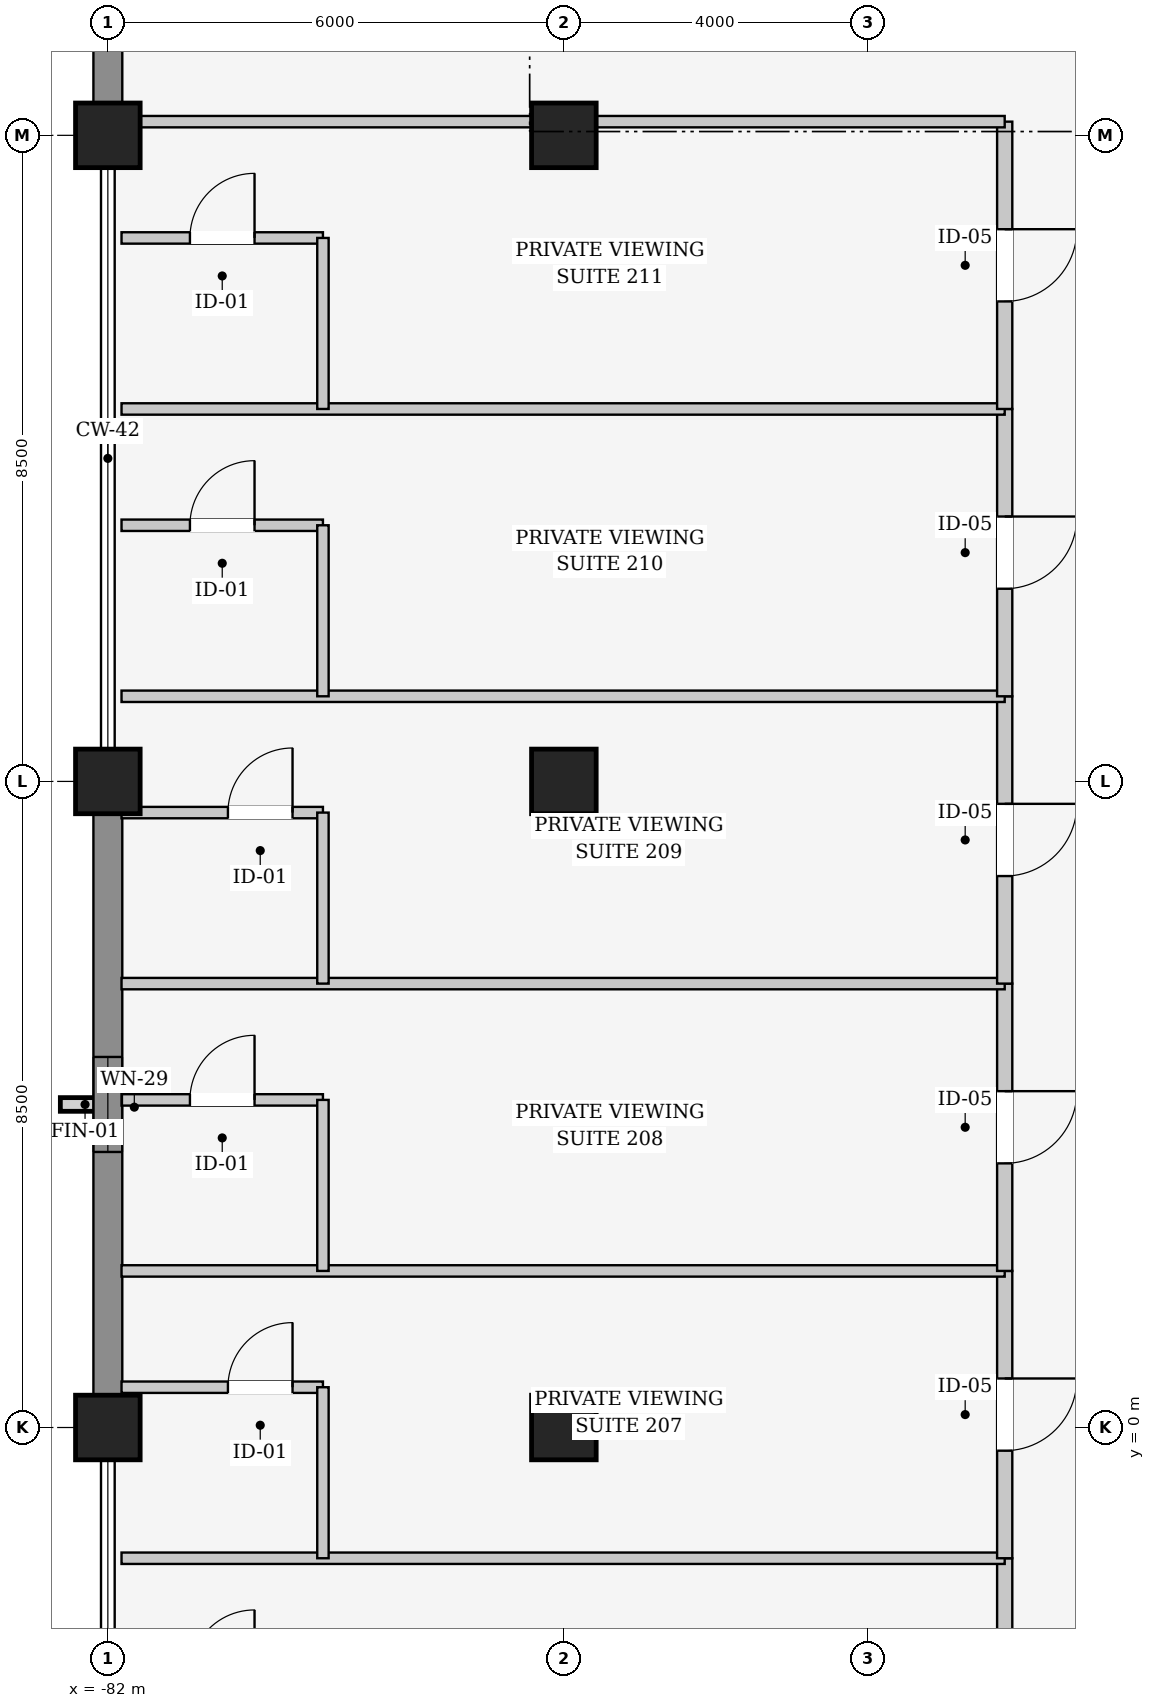
"""IFC4 building model, lengths in metres.
Left out: names, types, materials, properties, quantities, classifications, styles, units other than length and angle.
Written with IfcOpenShell. Run it as: python <this file> out.ifc"""

import sys

from ifc_helpers import new_model, si_unit, direction, frame, frame_2d, origin, origin_2d, place, context, subcontext, project, spatial, rectangle, extrude, element, fill, save


model = new_model("IFC4")
c1 = context("Model", 3, precision=1e-05, world=origin(), true_north=direction((0.0, 1.0)))
c2 = subcontext(c1, "Body", "Model", "MODEL_VIEW")
j1 = project(units=[si_unit("LENGTHUNIT", "METRE"), si_unit("PLANEANGLEUNIT", "RADIAN")], contexts=[c1])
p1 = place(None, origin())
s1 = spatial("IfcSite", under=j1, at=p1, CompositionType="ELEMENT")
p2 = place(p1, origin())
s2 = spatial("IfcBuilding", under=s1, at=p2, CompositionType="ELEMENT")
p3 = place(p2, frame((0.0, 0.0, 11.4)))
s3 = spatial("IfcBuildingStorey", under=s2, at=p3, CompositionType="ELEMENT", Elevation=11.4)
for number, where, z_axis, x_axis in (
    (1, (-82.0, 0.0, 0.0), (0.0, 0.0, 1.0), (1.0, 0.0, 0.0)),
    (2, (-82.0, 8.5, 0.0), (0.0, 0.0, 1.0), (1.0, 0.0, 0.0)),
    (3, (-82.0, 17.0, 0.0), (0.0, 0.0, 1.0), (1.0, 0.0, 0.0)),
    (4, (-76.0, 0.0, 0.0), (0.0, 0.0, 1.0), (1.0, 0.0, 0.0)),
    (5, (-76.0, 8.5, 0.0), (0.0, 0.0, 1.0), (1.0, 0.0, 0.0)),
    (6, (-76.0, 17.0, 0.0), (0.0, 0.0, 1.0), (1.0, 0.0, 0.0)),
):
    element("IfcColumn", number, at=place(p3, frame(where, z_axis=z_axis, x_axis=x_axis)), inside=s3, PredefinedType="COLUMN", context=c2, shape_type="SweptSolid", body=[
        extrude(rectangle(XDim=0.85, YDim=0.85, at=origin_2d()), origin(), (0.0, 0.0, 1.0), 4.8),
    ])
p4 = place(p3, frame((-82.0, 0.407, 0.0), z_axis=(0.0, 0.0, 1.0), x_axis=(0.0, 1.0, 0.0)))
e7 = element("IfcWall", 7, at=p4, inside=s3, PredefinedType="SOLIDWALL", context=c2, shape_type="SweptSolid", body=[
    extrude(rectangle(XDim=7.686, YDim=0.38, at=frame_2d((3.843, 0.0))), origin(), (0.0, 0.0, 1.0), 3.76),
])
p5 = place(p4, frame((3.218, 0.0, 0.9)))
e8 = element("IfcOpeningElement", 8, at=p5, cuts=e7, PredefinedType="OPENING", context=c2, shape_type="SweptSolid", body=[
    extrude(rectangle(XDim=1.25, YDim=2.0, at=frame_2d((0.625, 1.0))), frame((0.0, 0.2, 0.0), z_axis=(0.0, -1.0, 0.0), x_axis=(1.0, 0.0, 0.0)), (0.0, 0.0, 1.0), 0.4),
])
p6 = place(p3, frame((-82.0, 17.407, 0.0), z_axis=(0.0, 0.0, 1.0), x_axis=(0.0, 1.0, 0.0)))
e9 = element("IfcWall", 9, at=p6, inside=s3, PredefinedType="SOLIDWALL", context=c2, shape_type="SweptSolid", body=[
    extrude(rectangle(XDim=7.186, YDim=0.38, at=frame_2d((3.593, 0.0))), origin(), (0.0, 0.0, 1.0), 3.76),
])
p7 = place(p6, frame((2.868, 0.0, 0.9)))
e10 = element("IfcOpeningElement", 10, at=p7, cuts=e9, PredefinedType="OPENING", context=c2, shape_type="SweptSolid", body=[
    extrude(rectangle(XDim=1.45, YDim=2.0, at=frame_2d((0.725, 1.0))), frame((0.0, 0.2, 0.0), z_axis=(0.0, -1.0, 0.0), x_axis=(1.0, 0.0, 0.0)), (0.0, 0.0, 1.0), 0.4),
])
p8 = place(p3, frame((-70.2, -1.72, 0.0), z_axis=(0.0, 0.0, 1.0), x_axis=(0.0, -1.0, 0.0)))
e11 = element("IfcWall", 11, at=p8, inside=s3, PredefinedType="PARTITIONING", context=c2, shape_type="SweptSolid", body=[
    extrude(rectangle(XDim=3.78, YDim=0.2, at=frame_2d((1.89, 0.0))), origin(), (0.0, 0.0, 1.0), 4.14),
])
p9 = place(p8, frame((1.415, 0.0, 0.0)))
e12 = element("IfcOpeningElement", 12, at=p9, cuts=e11, PredefinedType="OPENING", context=c2, shape_type="SweptSolid", body=[
    extrude(rectangle(XDim=0.95, YDim=2.25, at=frame_2d((0.475, 1.125))), frame((0.0, 0.11, 0.0), z_axis=(0.0, -1.0, 0.0), x_axis=(1.0, 0.0, 0.0)), (0.0, 0.0, 1.0), 0.22),
])
p10 = place(p3, frame((-81.82, -1.72, 0.0), z_axis=(0.0, 0.0, 1.0), x_axis=(1.0, 0.0, 0.0)))
e13 = element("IfcWall", 13, at=p10, inside=s3, PredefinedType="PARTITIONING", context=c2, shape_type="SweptSolid", body=[
    extrude(rectangle(XDim=11.62, YDim=0.15, at=frame_2d((5.81, 0.0))), origin(), (0.0, 0.0, 1.0), 3.845),
])
p11 = place(p3, frame((-81.82, 0.53, 0.0), z_axis=(0.0, 0.0, 1.0), x_axis=(1.0, 0.0, 0.0)))
e14 = element("IfcWall", 14, at=p11, inside=s3, PredefinedType="PARTITIONING", context=c2, shape_type="SweptSolid", body=[
    extrude(rectangle(XDim=2.65, YDim=0.15, at=frame_2d((1.325, 0.0))), origin(), (0.0, 0.0, 1.0), 3.845),
])
p12 = place(p11, frame((1.4, 0.0, 0.0)))
e15 = element("IfcOpeningElement", 15, at=p12, cuts=e14, PredefinedType="OPENING", context=c2, shape_type="SweptSolid", body=[
    extrude(rectangle(XDim=0.85, YDim=2.15, at=frame_2d((0.425, 1.075))), frame((0.0, 0.085, 0.0), z_axis=(0.0, -1.0, 0.0), x_axis=(1.0, 0.0, 0.0)), (0.0, 0.0, 1.0), 0.17),
])
p13 = place(p3, frame((-79.17, 0.53, 0.0), z_axis=(0.0, 0.0, 1.0), x_axis=(0.0, -1.0, 0.0)))
e16 = element("IfcWall", 16, at=p13, inside=s3, PredefinedType="PARTITIONING", context=c2, shape_type="SweptSolid", body=[
    extrude(rectangle(XDim=2.25, YDim=0.15, at=frame_2d((1.125, 0.0))), origin(), (0.0, 0.0, 1.0), 3.745),
])
p14 = place(p3, frame((-70.2, 2.06, 0.0), z_axis=(0.0, 0.0, 1.0), x_axis=(0.0, -1.0, 0.0)))
e17 = element("IfcWall", 17, at=p14, inside=s3, PredefinedType="PARTITIONING", context=c2, shape_type="SweptSolid", body=[
    extrude(rectangle(XDim=3.78, YDim=0.2, at=frame_2d((1.89, 0.0))), origin(), (0.0, 0.0, 1.0), 3.545),
])
p15 = place(p14, frame((1.415, 0.0, 0.0)))
e18 = element("IfcOpeningElement", 18, at=p15, cuts=e17, PredefinedType="OPENING", context=c2, shape_type="SweptSolid", body=[
    extrude(rectangle(XDim=0.95, YDim=2.25, at=frame_2d((0.475, 1.125))), frame((0.0, 0.11, 0.0), z_axis=(0.0, -1.0, 0.0), x_axis=(1.0, 0.0, 0.0)), (0.0, 0.0, 1.0), 0.22),
])
p16 = place(p3, frame((-81.82, 2.06, 0.0), z_axis=(0.0, 0.0, 1.0), x_axis=(1.0, 0.0, 0.0)))
e19 = element("IfcWall", 19, at=p16, inside=s3, PredefinedType="PARTITIONING", context=c2, shape_type="SweptSolid", body=[
    extrude(rectangle(XDim=11.62, YDim=0.15, at=frame_2d((5.81, 0.0))), origin(), (0.0, 0.0, 1.0), 3.845),
])
p17 = place(p3, frame((-81.82, 4.31, 0.0), z_axis=(0.0, 0.0, 1.0), x_axis=(1.0, 0.0, 0.0)))
e20 = element("IfcWall", 20, at=p17, inside=s3, PredefinedType="PARTITIONING", context=c2, shape_type="SweptSolid", body=[
    extrude(rectangle(XDim=2.65, YDim=0.15, at=frame_2d((1.325, 0.0))), origin(), (0.0, 0.0, 1.0), 3.845),
])
p18 = place(p17, frame((0.9, 0.0, 0.0)))
e21 = element("IfcOpeningElement", 21, at=p18, cuts=e20, PredefinedType="OPENING", context=c2, shape_type="SweptSolid", body=[
    extrude(rectangle(XDim=0.85, YDim=2.15, at=frame_2d((0.425, 1.075))), frame((0.0, 0.085, 0.0), z_axis=(0.0, -1.0, 0.0), x_axis=(1.0, 0.0, 0.0)), (0.0, 0.0, 1.0), 0.17),
])
p19 = place(p3, frame((-79.17, 4.31, 0.0), z_axis=(0.0, 0.0, 1.0), x_axis=(0.0, -1.0, 0.0)))
e22 = element("IfcWall", 22, at=p19, inside=s3, PredefinedType="PARTITIONING", context=c2, shape_type="SweptSolid", body=[
    extrude(rectangle(XDim=2.25, YDim=0.15, at=frame_2d((1.125, 0.0))), origin(), (0.0, 0.0, 1.0), 4.14),
])
p20 = place(p3, frame((-70.2, 5.84, 0.0), z_axis=(0.0, 0.0, 1.0), x_axis=(0.0, -1.0, 0.0)))
e23 = element("IfcWall", 23, at=p20, inside=s3, PredefinedType="PARTITIONING", context=c2, shape_type="SweptSolid", body=[
    extrude(rectangle(XDim=3.78, YDim=0.2, at=frame_2d((1.89, 0.0))), origin(), (0.0, 0.0, 1.0), 4.14),
])
p21 = place(p20, frame((1.415, 0.0, 0.0)))
e24 = element("IfcOpeningElement", 24, at=p21, cuts=e23, PredefinedType="OPENING", context=c2, shape_type="SweptSolid", body=[
    extrude(rectangle(XDim=0.95, YDim=2.25, at=frame_2d((0.475, 1.125))), frame((0.0, 0.11, 0.0), z_axis=(0.0, -1.0, 0.0), x_axis=(1.0, 0.0, 0.0)), (0.0, 0.0, 1.0), 0.22),
])
p22 = place(p3, frame((-81.82, 5.84, 0.0), z_axis=(0.0, 0.0, 1.0), x_axis=(1.0, 0.0, 0.0)))
e25 = element("IfcWall", 25, at=p22, inside=s3, PredefinedType="PARTITIONING", context=c2, shape_type="SweptSolid", body=[
    extrude(rectangle(XDim=11.62, YDim=0.15, at=frame_2d((5.81, 0.0))), origin(), (0.0, 0.0, 1.0), 3.845),
])
p23 = place(p3, frame((-81.82, 8.09, 0.0), z_axis=(0.0, 0.0, 1.0), x_axis=(1.0, 0.0, 0.0)))
e26 = element("IfcWall", 26, at=p23, inside=s3, PredefinedType="PARTITIONING", context=c2, shape_type="SweptSolid", body=[
    extrude(rectangle(XDim=2.65, YDim=0.15, at=frame_2d((1.325, 0.0))), origin(), (0.0, 0.0, 1.0), 3.745),
])
p24 = place(p23, frame((1.4, 0.0, 0.0)))
e27 = element("IfcOpeningElement", 27, at=p24, cuts=e26, PredefinedType="OPENING", context=c2, shape_type="SweptSolid", body=[
    extrude(rectangle(XDim=0.85, YDim=2.15, at=frame_2d((0.425, 1.075))), frame((0.0, 0.085, 0.0), z_axis=(0.0, -1.0, 0.0), x_axis=(1.0, 0.0, 0.0)), (0.0, 0.0, 1.0), 0.17),
])
p25 = place(p3, frame((-79.17, 8.09, 0.0), z_axis=(0.0, 0.0, 1.0), x_axis=(0.0, -1.0, 0.0)))
e28 = element("IfcWall", 28, at=p25, inside=s3, PredefinedType="PARTITIONING", context=c2, shape_type="SweptSolid", body=[
    extrude(rectangle(XDim=2.25, YDim=0.15, at=frame_2d((1.125, 0.0))), origin(), (0.0, 0.0, 1.0), 3.745),
])
p26 = place(p3, frame((-70.2, 9.62, 0.0), z_axis=(0.0, 0.0, 1.0), x_axis=(0.0, -1.0, 0.0)))
e29 = element("IfcWall", 29, at=p26, inside=s3, PredefinedType="PARTITIONING", context=c2, shape_type="SweptSolid", body=[
    extrude(rectangle(XDim=3.78, YDim=0.2, at=frame_2d((1.89, 0.0))), origin(), (0.0, 0.0, 1.0), 3.545),
])
p27 = place(p26, frame((1.415, 0.0, 0.0)))
e30 = element("IfcOpeningElement", 30, at=p27, cuts=e29, PredefinedType="OPENING", context=c2, shape_type="SweptSolid", body=[
    extrude(rectangle(XDim=0.95, YDim=2.25, at=frame_2d((0.475, 1.125))), frame((0.0, 0.11, 0.0), z_axis=(0.0, -1.0, 0.0), x_axis=(1.0, 0.0, 0.0)), (0.0, 0.0, 1.0), 0.22),
])
p28 = place(p3, frame((-81.82, 9.62, 0.0), z_axis=(0.0, 0.0, 1.0), x_axis=(1.0, 0.0, 0.0)))
e31 = element("IfcWall", 31, at=p28, inside=s3, PredefinedType="PARTITIONING", context=c2, shape_type="SweptSolid", body=[
    extrude(rectangle(XDim=11.62, YDim=0.15, at=frame_2d((5.81, 0.0))), origin(), (0.0, 0.0, 1.0), 3.845),
])
p29 = place(p3, frame((-81.82, 11.87, 0.0), z_axis=(0.0, 0.0, 1.0), x_axis=(1.0, 0.0, 0.0)))
e32 = element("IfcWall", 32, at=p29, inside=s3, PredefinedType="PARTITIONING", context=c2, shape_type="SweptSolid", body=[
    extrude(rectangle(XDim=2.65, YDim=0.15, at=frame_2d((1.325, 0.0))), origin(), (0.0, 0.0, 1.0), 3.845),
])
p30 = place(p29, frame((0.9, 0.0, 0.0)))
e33 = element("IfcOpeningElement", 33, at=p30, cuts=e32, PredefinedType="OPENING", context=c2, shape_type="SweptSolid", body=[
    extrude(rectangle(XDim=0.85, YDim=2.15, at=frame_2d((0.425, 1.075))), frame((0.0, 0.085, 0.0), z_axis=(0.0, -1.0, 0.0), x_axis=(1.0, 0.0, 0.0)), (0.0, 0.0, 1.0), 0.17),
])
p31 = place(p3, frame((-79.17, 11.87, 0.0), z_axis=(0.0, 0.0, 1.0), x_axis=(0.0, -1.0, 0.0)))
e34 = element("IfcWall", 34, at=p31, inside=s3, PredefinedType="PARTITIONING", context=c2, shape_type="SweptSolid", body=[
    extrude(rectangle(XDim=2.25, YDim=0.15, at=frame_2d((1.125, 0.0))), origin(), (0.0, 0.0, 1.0), 4.44),
])
p32 = place(p3, frame((-70.2, 13.4, 0.0), z_axis=(0.0, 0.0, 1.0), x_axis=(0.0, -1.0, 0.0)))
e35 = element("IfcWall", 35, at=p32, inside=s3, PredefinedType="PARTITIONING", context=c2, shape_type="SweptSolid", body=[
    extrude(rectangle(XDim=3.78, YDim=0.2, at=frame_2d((1.89, 0.0))), origin(), (0.0, 0.0, 1.0), 4.14),
])
p33 = place(p32, frame((1.415, 0.0, 0.0)))
e36 = element("IfcOpeningElement", 36, at=p33, cuts=e35, PredefinedType="OPENING", context=c2, shape_type="SweptSolid", body=[
    extrude(rectangle(XDim=0.95, YDim=2.25, at=frame_2d((0.475, 1.125))), frame((0.0, 0.11, 0.0), z_axis=(0.0, -1.0, 0.0), x_axis=(1.0, 0.0, 0.0)), (0.0, 0.0, 1.0), 0.22),
])
p34 = place(p3, frame((-81.82, 13.4, 0.0), z_axis=(0.0, 0.0, 1.0), x_axis=(1.0, 0.0, 0.0)))
e37 = element("IfcWall", 37, at=p34, inside=s3, PredefinedType="PARTITIONING", context=c2, shape_type="SweptSolid", body=[
    extrude(rectangle(XDim=11.62, YDim=0.15, at=frame_2d((5.81, 0.0))), origin(), (0.0, 0.0, 1.0), 3.845),
])
p35 = place(p3, frame((-81.82, 15.65, 0.0), z_axis=(0.0, 0.0, 1.0), x_axis=(1.0, 0.0, 0.0)))
e38 = element("IfcWall", 38, at=p35, inside=s3, PredefinedType="PARTITIONING", context=c2, shape_type="SweptSolid", body=[
    extrude(rectangle(XDim=2.65, YDim=0.15, at=frame_2d((1.325, 0.0))), origin(), (0.0, 0.0, 1.0), 3.845),
])
p36 = place(p35, frame((0.9, 0.0, 0.0)))
e39 = element("IfcOpeningElement", 39, at=p36, cuts=e38, PredefinedType="OPENING", context=c2, shape_type="SweptSolid", body=[
    extrude(rectangle(XDim=0.85, YDim=2.15, at=frame_2d((0.425, 1.075))), frame((0.0, 0.085, 0.0), z_axis=(0.0, -1.0, 0.0), x_axis=(1.0, 0.0, 0.0)), (0.0, 0.0, 1.0), 0.17),
])
p37 = place(p3, frame((-79.17, 15.65, 0.0), z_axis=(0.0, 0.0, 1.0), x_axis=(0.0, -1.0, 0.0)))
e40 = element("IfcWall", 40, at=p37, inside=s3, PredefinedType="PARTITIONING", context=c2, shape_type="SweptSolid", body=[
    extrude(rectangle(XDim=2.25, YDim=0.15, at=frame_2d((1.125, 0.0))), origin(), (0.0, 0.0, 1.0), 4.44),
])
p38 = place(p3, frame((-70.2, 17.18, 0.0), z_axis=(0.0, 0.0, 1.0), x_axis=(0.0, -1.0, 0.0)))
e41 = element("IfcWall", 41, at=p38, inside=s3, PredefinedType="PARTITIONING", context=c2, shape_type="SweptSolid", body=[
    extrude(rectangle(XDim=3.78, YDim=0.2, at=frame_2d((1.89, 0.0))), origin(), (0.0, 0.0, 1.0), 3.545),
])
p39 = place(p38, frame((1.415, 0.0, 0.0)))
e42 = element("IfcOpeningElement", 42, at=p39, cuts=e41, PredefinedType="OPENING", context=c2, shape_type="SweptSolid", body=[
    extrude(rectangle(XDim=0.95, YDim=2.25, at=frame_2d((0.475, 1.125))), frame((0.0, 0.11, 0.0), z_axis=(0.0, -1.0, 0.0), x_axis=(1.0, 0.0, 0.0)), (0.0, 0.0, 1.0), 0.22),
])
p40 = place(p3, frame((-81.82, 17.18, 0.0), z_axis=(0.0, 0.0, 1.0), x_axis=(1.0, 0.0, 0.0)))
e43 = element("IfcWall", 43, at=p40, inside=s3, PredefinedType="PARTITIONING", context=c2, shape_type="SweptSolid", body=[
    extrude(rectangle(XDim=11.62, YDim=0.15, at=frame_2d((5.81, 0.0))), origin(), (0.0, 0.0, 1.0), 3.545),
])
p41 = place(p5, origin())
e44 = element("IfcWindow", 44, at=p41, inside=s3, PartitioningType="SINGLE_PANEL", PredefinedType="WINDOW", context=c2, shape_type="SweptSolid", body=[
    extrude(rectangle(XDim=1.25, YDim=2.0, at=frame_2d((0.625, 1.0))), frame((0.0, 0.03, 0.0), z_axis=(0.0, -1.0, 0.0), x_axis=(1.0, 0.0, 0.0)), (0.0, 0.0, 1.0), 0.06),
])
fill(e8, e44)
p42 = place(p12, origin())
e45 = element("IfcDoor", 45, at=p42, inside=s3, OperationType="SINGLE_SWING_RIGHT", PredefinedType="DOOR", context=c2, shape_type="SweptSolid", body=[
    extrude(rectangle(XDim=0.85, YDim=2.15, at=frame_2d((0.425, 1.075))), frame((0.0, 0.025, 0.0), z_axis=(0.0, -1.0, 0.0), x_axis=(1.0, 0.0, 0.0)), (0.0, 0.0, 1.0), 0.05),
])
fill(e15, e45)
p43 = place(p15, origin())
e46 = element("IfcDoor", 46, at=p43, inside=s3, OperationType="SINGLE_SWING_LEFT", PredefinedType="DOOR", context=c2, shape_type="SweptSolid", body=[
    extrude(rectangle(XDim=0.95, YDim=2.25, at=frame_2d((0.475, 1.125))), frame((0.0, 0.025, 0.0), z_axis=(0.0, -1.0, 0.0), x_axis=(1.0, 0.0, 0.0)), (0.0, 0.0, 1.0), 0.05),
])
fill(e18, e46)
p44 = place(p18, origin())
e47 = element("IfcDoor", 47, at=p44, inside=s3, OperationType="SINGLE_SWING_RIGHT", PredefinedType="DOOR", context=c2, shape_type="SweptSolid", body=[
    extrude(rectangle(XDim=0.85, YDim=2.15, at=frame_2d((0.425, 1.075))), frame((0.0, 0.025, 0.0), z_axis=(0.0, -1.0, 0.0), x_axis=(1.0, 0.0, 0.0)), (0.0, 0.0, 1.0), 0.05),
])
fill(e21, e47)
p45 = place(p21, origin())
e48 = element("IfcDoor", 48, at=p45, inside=s3, OperationType="SINGLE_SWING_LEFT", PredefinedType="DOOR", context=c2, shape_type="SweptSolid", body=[
    extrude(rectangle(XDim=0.95, YDim=2.25, at=frame_2d((0.475, 1.125))), frame((0.0, 0.025, 0.0), z_axis=(0.0, -1.0, 0.0), x_axis=(1.0, 0.0, 0.0)), (0.0, 0.0, 1.0), 0.05),
])
fill(e24, e48)
p46 = place(p24, origin())
e49 = element("IfcDoor", 49, at=p46, inside=s3, OperationType="SINGLE_SWING_RIGHT", PredefinedType="DOOR", context=c2, shape_type="SweptSolid", body=[
    extrude(rectangle(XDim=0.85, YDim=2.15, at=frame_2d((0.425, 1.075))), frame((0.0, 0.025, 0.0), z_axis=(0.0, -1.0, 0.0), x_axis=(1.0, 0.0, 0.0)), (0.0, 0.0, 1.0), 0.05),
])
fill(e27, e49)
p47 = place(p27, origin())
e50 = element("IfcDoor", 50, at=p47, inside=s3, OperationType="SINGLE_SWING_LEFT", PredefinedType="DOOR", context=c2, shape_type="SweptSolid", body=[
    extrude(rectangle(XDim=0.95, YDim=2.25, at=frame_2d((0.475, 1.125))), frame((0.0, 0.025, 0.0), z_axis=(0.0, -1.0, 0.0), x_axis=(1.0, 0.0, 0.0)), (0.0, 0.0, 1.0), 0.05),
])
fill(e30, e50)
p48 = place(p30, origin())
e51 = element("IfcDoor", 51, at=p48, inside=s3, OperationType="SINGLE_SWING_RIGHT", PredefinedType="DOOR", context=c2, shape_type="SweptSolid", body=[
    extrude(rectangle(XDim=0.85, YDim=2.15, at=frame_2d((0.425, 1.075))), frame((0.0, 0.025, 0.0), z_axis=(0.0, -1.0, 0.0), x_axis=(1.0, 0.0, 0.0)), (0.0, 0.0, 1.0), 0.05),
])
fill(e33, e51)
p49 = place(p33, origin())
e52 = element("IfcDoor", 52, at=p49, inside=s3, OperationType="SINGLE_SWING_LEFT", PredefinedType="DOOR", context=c2, shape_type="SweptSolid", body=[
    extrude(rectangle(XDim=0.95, YDim=2.25, at=frame_2d((0.475, 1.125))), frame((0.0, 0.025, 0.0), z_axis=(0.0, -1.0, 0.0), x_axis=(1.0, 0.0, 0.0)), (0.0, 0.0, 1.0), 0.05),
])
fill(e36, e52)
p50 = place(p36, origin())
e53 = element("IfcDoor", 53, at=p50, inside=s3, OperationType="SINGLE_SWING_RIGHT", PredefinedType="DOOR", context=c2, shape_type="SweptSolid", body=[
    extrude(rectangle(XDim=0.85, YDim=2.15, at=frame_2d((0.425, 1.075))), frame((0.0, 0.025, 0.0), z_axis=(0.0, -1.0, 0.0), x_axis=(1.0, 0.0, 0.0)), (0.0, 0.0, 1.0), 0.05),
])
fill(e39, e53)
p51 = place(p39, origin())
e54 = element("IfcDoor", 54, at=p51, inside=s3, OperationType="SINGLE_SWING_LEFT", PredefinedType="DOOR", context=c2, shape_type="SweptSolid", body=[
    extrude(rectangle(XDim=0.95, YDim=2.25, at=frame_2d((0.475, 1.125))), frame((0.0, 0.025, 0.0), z_axis=(0.0, -1.0, 0.0), x_axis=(1.0, 0.0, 0.0)), (0.0, 0.0, 1.0), 0.05),
])
fill(e42, e54)
save(model, sys.argv[1])
